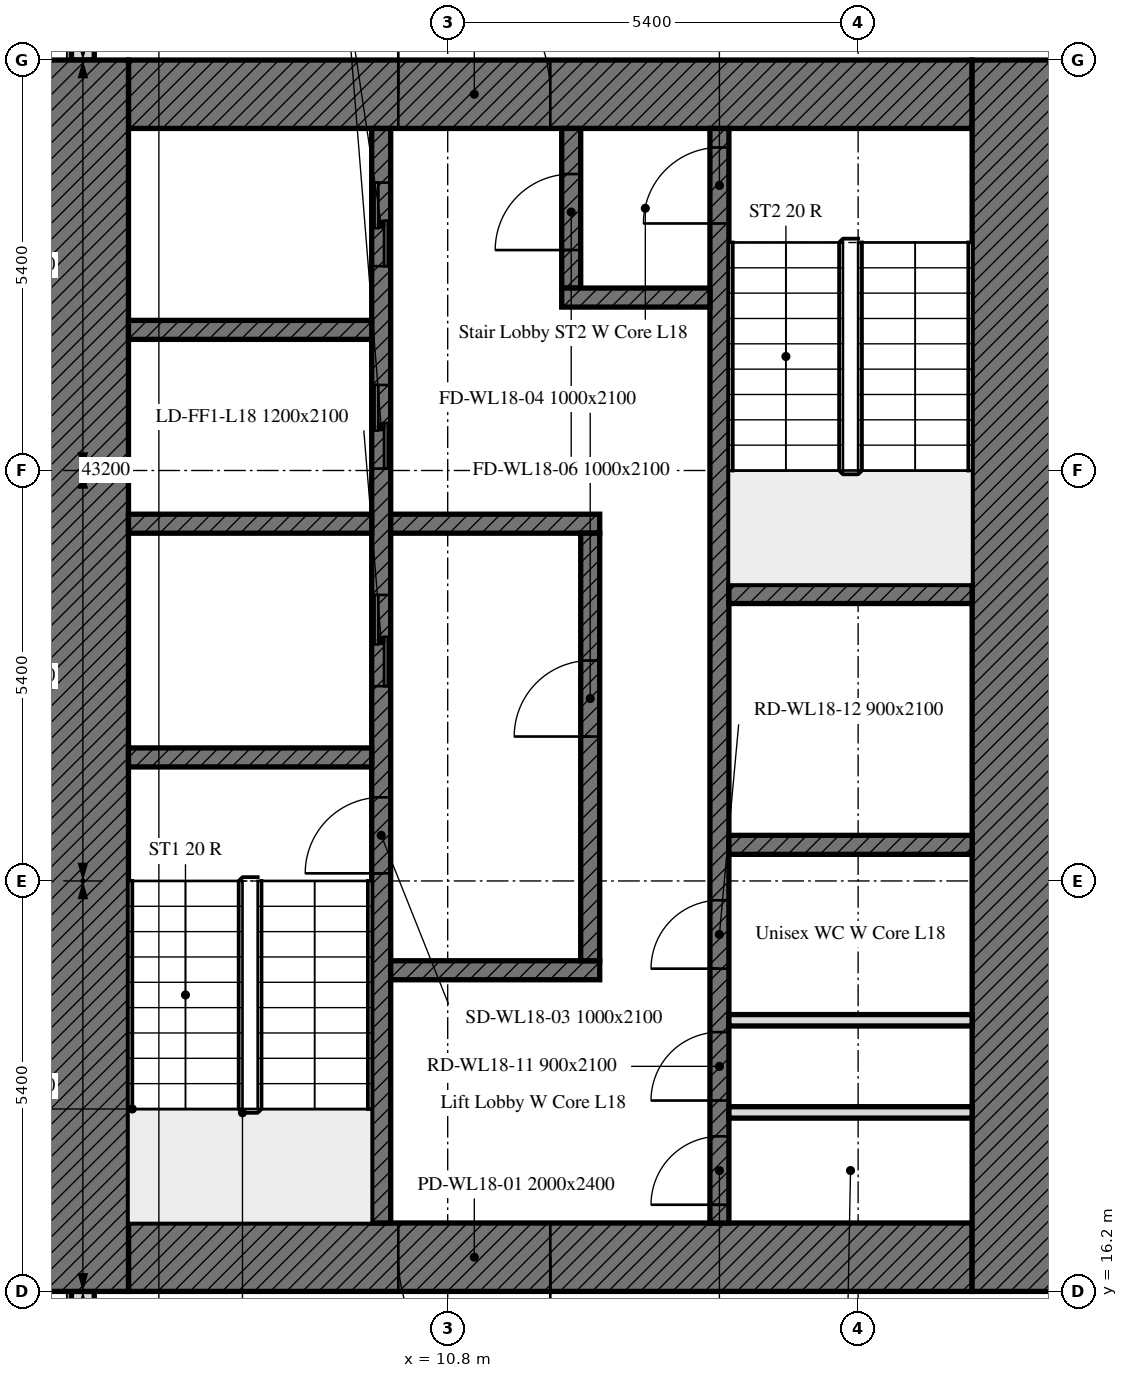
"""IFC4 building model, lengths in metres.
Left out: names, types, materials, properties, quantities, classifications, styles, units other than length and angle.
Written with IfcOpenShell. Run it as: python <this file> out.ifc"""

import sys

from ifc_helpers import new_model, si_unit, direction, frame, frame_2d, origin, place, context, subcontext, project, spatial, rectangle, extrude, element, fill, save


model = new_model("IFC4")
c1 = context("Model", 3, precision=1e-05, world=origin(), true_north=direction((0.0, 1.0)))
c2 = subcontext(c1, "Body", "Model", "MODEL_VIEW")
j1 = project(units=[si_unit("LENGTHUNIT", "METRE"), si_unit("PLANEANGLEUNIT", "RADIAN")], contexts=[c1])
p1 = place(None, origin())
s1 = spatial("IfcSite", under=j1, at=p1, CompositionType="ELEMENT")
p2 = place(p1, origin())
s2 = spatial("IfcBuilding", under=s1, at=p2, CompositionType="ELEMENT")
p3 = place(p2, frame((0.0, 0.0, 80.2)))
s3 = spatial("IfcBuildingStorey", under=s2, at=p3, CompositionType="ELEMENT", Elevation=80.2)
p4 = place(p3, frame((6.0, 43.014, 0.0), z_axis=(0.0, 0.0, 1.0), x_axis=(0.0, -1.0, 0.0)))
e1 = element("IfcWall", 1, at=p4, inside=s3, PredefinedType="SOLIDWALL", context=c2, shape_type="SweptSolid", body=[
    extrude(rectangle(XDim=10.614, YDim=0.3, at=frame_2d((5.307, 0.0))), origin(), (0.0, 0.0, 1.0), 3.5),
])
p5 = place(p4, frame((0.814, 0.0, 0.9)))
e2 = element("IfcOpeningElement", 2, at=p5, cuts=e1, PredefinedType="OPENING", context=c2, shape_type="SweptSolid", body=[
    extrude(rectangle(XDim=3.4, YDim=1.7, at=frame_2d((1.7, 0.85))), frame((0.0, 0.16, 0.0), z_axis=(0.0, -1.0, 0.0), x_axis=(1.0, 0.0, 0.0)), (0.0, 0.0, 1.0), 0.32),
])
p6 = place(p3, frame((6.0, 16.2, 0.0), z_axis=(0.0, 0.0, 1.0), x_axis=(0.0, -1.0, 0.0)))
e3 = element("IfcWall", 3, at=p6, inside=s3, PredefinedType="SOLIDWALL", context=c2, shape_type="SweptSolid", body=[
    extrude(rectangle(XDim=5.214, YDim=0.3, at=frame_2d((2.607, 0.0))), origin(), (0.0, 0.0, 1.0), 3.5),
])
p7 = place(p3, frame((17.7, 16.65, 0.0), z_axis=(0.0, 0.0, 1.0), x_axis=(-1.0, 0.0, 0.0)))
e4 = element("IfcWall", 4, at=p7, inside=s3, PredefinedType="SOLIDWALL", context=c2, shape_type="SweptSolid", body=[
    extrude(rectangle(XDim=11.1, YDim=0.9, at=frame_2d((5.55, 0.0))), origin(), (0.0, 0.0, 1.0), 3.5),
])
p8 = place(p7, frame((5.55, 0.0, 0.0)))
e5 = element("IfcOpeningElement", 5, at=p8, cuts=e4, PredefinedType="OPENING", context=c2, shape_type="SweptSolid", body=[
    extrude(rectangle(XDim=2.0, YDim=2.4, at=frame_2d((1.0, 1.2))), frame((0.0, 0.45, 0.0), z_axis=(0.0, -1.0, 0.0), x_axis=(1.0, 0.0, 0.0)), (0.0, 0.0, 1.0), 0.9),
])
p9 = place(p3, frame((6.6, 31.95, 0.0), z_axis=(0.0, 0.0, 1.0), x_axis=(1.0, 0.0, 0.0)))
e6 = element("IfcWall", 6, at=p9, inside=s3, PredefinedType="SOLIDWALL", context=c2, shape_type="SweptSolid", body=[
    extrude(rectangle(XDim=11.1, YDim=0.9, at=frame_2d((5.55, 0.0))), origin(), (0.0, 0.0, 1.0), 3.5),
])
p10 = place(p9, frame((3.55, 0.0, 0.0)))
e7 = element("IfcOpeningElement", 7, at=p10, cuts=e6, PredefinedType="OPENING", context=c2, shape_type="SweptSolid", body=[
    extrude(rectangle(XDim=2.0, YDim=2.4, at=frame_2d((1.0, 1.2))), frame((0.0, 0.45, 0.0), z_axis=(0.0, -1.0, 0.0), x_axis=(1.0, 0.0, 0.0)), (0.0, 0.0, 1.0), 0.9),
])
for number, where, z_axis, x_axis in (
    (8, (6.0, 16.2, 0.0), (0.0, 0.0, 1.0), (0.0, 1.0, 0.0)),
    (9, (18.3, 32.4, 0.0), (0.0, 0.0, 1.0), (0.0, -1.0, 0.0)),
):
    element("IfcWall", number, at=place(p3, frame(where, z_axis=z_axis, x_axis=x_axis)), inside=s3, PredefinedType="SOLIDWALL", context=c2, shape_type="SweptSolid", body=[
        extrude(rectangle(XDim=16.2, YDim=1.2, at=frame_2d((8.1, 0.0))), origin(), (0.0, 0.0, 1.0), 3.5),
    ])
p11 = place(p3, frame((9.925, 17.1, 0.0), z_axis=(0.0, 0.0, 1.0), x_axis=(0.0, 1.0, 0.0)))
e10 = element("IfcWall", 10, at=p11, inside=s3, PredefinedType="SOLIDWALL", context=c2, shape_type="SweptSolid", body=[
    extrude(rectangle(XDim=14.4, YDim=0.25, at=frame_2d((7.2, 0.0))), origin(), (0.0, 0.0, 1.0), 3.5),
])
p12 = place(p11, frame((4.6, 0.0, 0.0)))
e11 = element("IfcOpeningElement", 11, at=p12, cuts=e10, PredefinedType="OPENING", context=c2, shape_type="SweptSolid", body=[
    extrude(rectangle(XDim=1.0, YDim=2.1, at=frame_2d((0.5, 1.05))), frame((0.0, 0.125, 0.0), z_axis=(0.0, -1.0, 0.0), x_axis=(1.0, 0.0, 0.0)), (0.0, 0.0, 1.0), 0.25),
])
p13 = place(p11, frame((7.062, 0.0, 0.0)))
e12 = element("IfcOpeningElement", 12, at=p13, cuts=e10, PredefinedType="OPENING", context=c2, shape_type="SweptSolid", body=[
    extrude(rectangle(XDim=1.2, YDim=2.1, at=frame_2d((0.6, 1.05))), frame((0.0, 0.125, 0.0), z_axis=(0.0, -1.0, 0.0), x_axis=(1.0, 0.0, 0.0)), (0.0, 0.0, 1.0), 0.25),
])
p14 = place(p11, frame((9.925, 0.0, 0.0)))
e13 = element("IfcOpeningElement", 13, at=p14, cuts=e10, PredefinedType="OPENING", context=c2, shape_type="SweptSolid", body=[
    extrude(rectangle(XDim=1.1, YDim=2.1, at=frame_2d((0.55, 1.05))), frame((0.0, 0.125, 0.0), z_axis=(0.0, -1.0, 0.0), x_axis=(1.0, 0.0, 0.0)), (0.0, 0.0, 1.0), 0.25),
])
p15 = place(p11, frame((12.587, 0.0, 0.0)))
e14 = element("IfcOpeningElement", 14, at=p15, cuts=e10, PredefinedType="OPENING", context=c2, shape_type="SweptSolid", body=[
    extrude(rectangle(XDim=1.1, YDim=2.1, at=frame_2d((0.55, 1.05))), frame((0.0, 0.125, 0.0), z_axis=(0.0, -1.0, 0.0), x_axis=(1.0, 0.0, 0.0)), (0.0, 0.0, 1.0), 0.25),
])
p16 = place(p3, frame((14.375, 17.1, 0.0), z_axis=(0.0, 0.0, 1.0), x_axis=(0.0, 1.0, 0.0)))
e15 = element("IfcWall", 15, at=p16, inside=s3, PredefinedType="SOLIDWALL", context=c2, shape_type="SweptSolid", body=[
    extrude(rectangle(XDim=14.4, YDim=0.25, at=frame_2d((7.2, 0.0))), origin(), (0.0, 0.0, 1.0), 3.5),
])
p17 = place(p16, frame((13.15, 0.0, 0.0)))
e16 = element("IfcOpeningElement", 16, at=p17, cuts=e15, PredefinedType="OPENING", context=c2, shape_type="SweptSolid", body=[
    extrude(rectangle(XDim=1.0, YDim=2.1, at=frame_2d((0.5, 1.05))), frame((0.0, 0.125, 0.0), z_axis=(0.0, -1.0, 0.0), x_axis=(1.0, 0.0, 0.0)), (0.0, 0.0, 1.0), 0.25),
])
p18 = place(p16, frame((0.24, 0.0, 0.0)))
e17 = element("IfcOpeningElement", 17, at=p18, cuts=e15, PredefinedType="OPENING", context=c2, shape_type="SweptSolid", body=[
    extrude(rectangle(XDim=0.9, YDim=2.1, at=frame_2d((0.45, 1.05))), frame((0.0, 0.125, 0.0), z_axis=(0.0, -1.0, 0.0), x_axis=(1.0, 0.0, 0.0)), (0.0, 0.0, 1.0), 0.25),
])
p19 = place(p16, frame((1.611, 0.0, 0.0)))
e18 = element("IfcOpeningElement", 18, at=p19, cuts=e15, PredefinedType="OPENING", context=c2, shape_type="SweptSolid", body=[
    extrude(rectangle(XDim=0.9, YDim=2.1, at=frame_2d((0.45, 1.05))), frame((0.0, 0.125, 0.0), z_axis=(0.0, -1.0, 0.0), x_axis=(1.0, 0.0, 0.0)), (0.0, 0.0, 1.0), 0.25),
])
p20 = place(p16, frame((3.346, 0.0, 0.0)))
e19 = element("IfcOpeningElement", 19, at=p20, cuts=e15, PredefinedType="OPENING", context=c2, shape_type="SweptSolid", body=[
    extrude(rectangle(XDim=0.9, YDim=2.1, at=frame_2d((0.45, 1.05))), frame((0.0, 0.125, 0.0), z_axis=(0.0, -1.0, 0.0), x_axis=(1.0, 0.0, 0.0)), (0.0, 0.0, 1.0), 0.25),
])
for number, where, z_axis, x_axis in (
    (20, (6.6, 23.225, 0.0), (0.0, 0.0, 1.0), (1.0, 0.0, 0.0)),
    (21, (14.5, 25.375, 0.0), (0.0, 0.0, 1.0), (1.0, 0.0, 0.0)),
    (22, (14.5, 22.075, 0.0), (0.0, 0.0, 1.0), (1.0, 0.0, 0.0)),
    (23, (6.6, 26.3, 0.0), (0.0, 0.0, 1.0), (1.0, 0.0, 0.0)),
):
    element("IfcWall", number, at=place(p3, frame(where, z_axis=z_axis, x_axis=x_axis)), inside=s3, PredefinedType="SOLIDWALL", context=c2, shape_type="SweptSolid", body=[
        extrude(rectangle(XDim=3.2, YDim=0.25, at=frame_2d((1.6, 0.0))), origin(), (0.0, 0.0, 1.0), 3.5),
    ])
for number, where, z_axis, x_axis in (
    (24, (10.05, 26.3, 0.0), (0.0, 0.0, 1.0), (1.0, 0.0, 0.0)),
    (25, (10.05, 20.425, 0.0), (0.0, 0.0, 1.0), (1.0, 0.0, 0.0)),
):
    element("IfcWall", number, at=place(p3, frame(where, z_axis=z_axis, x_axis=x_axis)), inside=s3, PredefinedType="SOLIDWALL", context=c2, shape_type="SweptSolid", body=[
        extrude(rectangle(XDim=2.75, YDim=0.25, at=frame_2d((1.375, 0.0))), origin(), (0.0, 0.0, 1.0), 3.5),
    ])
p21 = place(p3, frame((12.425, 29.4, 0.0), z_axis=(0.0, 0.0, 1.0), x_axis=(0.0, 1.0, 0.0)))
e26 = element("IfcWall", 26, at=p21, inside=s3, PredefinedType="SOLIDWALL", context=c2, shape_type="SweptSolid", body=[
    extrude(rectangle(XDim=2.1, YDim=0.25, at=frame_2d((1.05, 0.0))), origin(), (0.0, 0.0, 1.0), 3.5),
])
p22 = place(p21, frame((0.5, 0.0, 0.0)))
e27 = element("IfcOpeningElement", 27, at=p22, cuts=e26, PredefinedType="OPENING", context=c2, shape_type="SweptSolid", body=[
    extrude(rectangle(XDim=1.0, YDim=2.1, at=frame_2d((0.5, 1.05))), frame((0.0, 0.125, 0.0), z_axis=(0.0, -1.0, 0.0), x_axis=(1.0, 0.0, 0.0)), (0.0, 0.0, 1.0), 0.25),
])
p23 = place(p3, frame((12.3, 29.275, 0.0), z_axis=(0.0, 0.0, 1.0), x_axis=(1.0, 0.0, 0.0)))
e28 = element("IfcWall", 28, at=p23, inside=s3, PredefinedType="SOLIDWALL", context=c2, shape_type="SweptSolid", body=[
    extrude(rectangle(XDim=1.95, YDim=0.25, at=frame_2d((0.975, 0.0))), origin(), (0.0, 0.0, 1.0), 3.5),
])
p24 = place(p3, frame((12.675, 20.55, 0.0), z_axis=(0.0, 0.0, 1.0), x_axis=(0.0, 1.0, 0.0)))
e29 = element("IfcWall", 29, at=p24, inside=s3, PredefinedType="SOLIDWALL", context=c2, shape_type="SweptSolid", body=[
    extrude(rectangle(XDim=5.625, YDim=0.25, at=frame_2d((2.812, 0.0))), origin(), (0.0, 0.0, 1.0), 3.5),
])
p25 = place(p24, frame((2.95, 0.0, 0.0)))
e30 = element("IfcOpeningElement", 30, at=p25, cuts=e29, PredefinedType="OPENING", context=c2, shape_type="SweptSolid", body=[
    extrude(rectangle(XDim=1.0, YDim=2.1, at=frame_2d((0.5, 1.05))), frame((0.0, 0.125, 0.0), z_axis=(0.0, -1.0, 0.0), x_axis=(1.0, 0.0, 0.0)), (0.0, 0.0, 1.0), 0.25),
])
p26 = place(p3, frame((6.6, 28.85, 0.0), z_axis=(0.0, 0.0, 1.0), x_axis=(1.0, 0.0, 0.0)))
e31 = element("IfcWall", 31, at=p26, inside=s3, PredefinedType="SOLIDWALL", context=c2, shape_type="SweptSolid", body=[
    extrude(rectangle(XDim=3.2, YDim=0.25, at=frame_2d((1.6, 0.0))), origin(), (0.0, 0.0, 1.0), 3.5),
])
for number, where, z_axis, x_axis in (
    (32, (14.5, 18.555, 0.0), (0.0, 0.0, 1.0), (1.0, 0.0, 0.0)),
    (33, (14.5, 19.767, 0.0), (0.0, 0.0, 1.0), (1.0, 0.0, 0.0)),
):
    element("IfcWall", number, at=place(p3, frame(where, z_axis=z_axis, x_axis=x_axis)), inside=s3, PredefinedType="PARTITIONING", context=c2, shape_type="SweptSolid", body=[
        extrude(rectangle(XDim=3.2, YDim=0.15, at=frame_2d((1.6, 0.0))), origin(), (0.0, 0.0, 1.0), 3.5),
    ])
p27 = place(p8, origin())
e34 = element("IfcDoor", 34, at=p27, inside=s3, OperationType="DOUBLE_DOOR_SINGLE_SWING", PredefinedType="DOOR", context=c2, shape_type="SweptSolid", body=[
    extrude(rectangle(XDim=2.0, YDim=2.4, at=frame_2d((1.0, 1.2))), frame((0.0, 0.025, 0.0), z_axis=(0.0, -1.0, 0.0), x_axis=(1.0, 0.0, 0.0)), (0.0, 0.0, 1.0), 0.05),
])
fill(e5, e34)
p28 = place(p10, origin())
e35 = element("IfcDoor", 35, at=p28, inside=s3, OperationType="DOUBLE_DOOR_SINGLE_SWING", PredefinedType="DOOR", context=c2, shape_type="SweptSolid", body=[
    extrude(rectangle(XDim=2.0, YDim=2.4, at=frame_2d((1.0, 1.2))), frame((0.0, 0.025, 0.0), z_axis=(0.0, -1.0, 0.0), x_axis=(1.0, 0.0, 0.0)), (0.0, 0.0, 1.0), 0.05),
])
fill(e7, e35)
p29 = place(p12, origin())
e36 = element("IfcDoor", 36, at=p29, inside=s3, OperationType="SINGLE_SWING_LEFT", PredefinedType="DOOR", context=c2, shape_type="SweptSolid", body=[
    extrude(rectangle(XDim=1.0, YDim=2.1, at=frame_2d((0.5, 1.05))), frame((0.0, 0.025, 0.0), z_axis=(0.0, -1.0, 0.0), x_axis=(1.0, 0.0, 0.0)), (0.0, 0.0, 1.0), 0.05),
])
fill(e11, e36)
p30 = place(p25, origin())
e37 = element("IfcDoor", 37, at=p30, inside=s3, OperationType="SINGLE_SWING_LEFT", PredefinedType="DOOR", context=c2, shape_type="SweptSolid", body=[
    extrude(rectangle(XDim=1.0, YDim=2.1, at=frame_2d((0.5, 1.05))), frame((0.0, 0.025, 0.0), z_axis=(0.0, -1.0, 0.0), x_axis=(1.0, 0.0, 0.0)), (0.0, 0.0, 1.0), 0.05),
])
fill(e30, e37)
p31 = place(p17, origin())
e38 = element("IfcDoor", 38, at=p31, inside=s3, OperationType="SINGLE_SWING_LEFT", PredefinedType="DOOR", context=c2, shape_type="SweptSolid", body=[
    extrude(rectangle(XDim=1.0, YDim=2.1, at=frame_2d((0.5, 1.05))), frame((0.0, 0.025, 0.0), z_axis=(0.0, -1.0, 0.0), x_axis=(1.0, 0.0, 0.0)), (0.0, 0.0, 1.0), 0.05),
])
fill(e16, e38)
p32 = place(p22, origin())
e39 = element("IfcDoor", 39, at=p32, inside=s3, OperationType="SINGLE_SWING_LEFT", PredefinedType="DOOR", context=c2, shape_type="SweptSolid", body=[
    extrude(rectangle(XDim=1.0, YDim=2.1, at=frame_2d((0.5, 1.05))), frame((0.0, 0.025, 0.0), z_axis=(0.0, -1.0, 0.0), x_axis=(1.0, 0.0, 0.0)), (0.0, 0.0, 1.0), 0.05),
])
fill(e27, e39)
p33 = place(p13, origin())
e40 = element("IfcDoor", 40, at=p33, inside=s3, OperationType="DOUBLE_DOOR_SLIDING", PredefinedType="DOOR", context=c2, shape_type="SweptSolid", body=[
    extrude(rectangle(XDim=1.2, YDim=2.1, at=frame_2d((0.6, 1.05))), frame((0.0, 0.025, 0.0), z_axis=(0.0, -1.0, 0.0), x_axis=(1.0, 0.0, 0.0)), (0.0, 0.0, 1.0), 0.05),
])
fill(e12, e40)
p34 = place(p14, origin())
e41 = element("IfcDoor", 41, at=p34, inside=s3, OperationType="DOUBLE_DOOR_SLIDING", PredefinedType="DOOR", context=c2, shape_type="SweptSolid", body=[
    extrude(rectangle(XDim=1.1, YDim=2.1, at=frame_2d((0.55, 1.05))), frame((0.0, 0.025, 0.0), z_axis=(0.0, -1.0, 0.0), x_axis=(1.0, 0.0, 0.0)), (0.0, 0.0, 1.0), 0.05),
])
fill(e13, e41)
p35 = place(p15, origin())
e42 = element("IfcDoor", 42, at=p35, inside=s3, OperationType="DOUBLE_DOOR_SLIDING", PredefinedType="DOOR", context=c2, shape_type="SweptSolid", body=[
    extrude(rectangle(XDim=1.1, YDim=2.1, at=frame_2d((0.55, 1.05))), frame((0.0, 0.025, 0.0), z_axis=(0.0, -1.0, 0.0), x_axis=(1.0, 0.0, 0.0)), (0.0, 0.0, 1.0), 0.05),
])
fill(e14, e42)
p36 = place(p18, origin())
e43 = element("IfcDoor", 43, at=p36, inside=s3, OperationType="SINGLE_SWING_LEFT", PredefinedType="DOOR", context=c2, shape_type="SweptSolid", body=[
    extrude(rectangle(XDim=0.9, YDim=2.1, at=frame_2d((0.45, 1.05))), frame((0.0, 0.025, 0.0), z_axis=(0.0, -1.0, 0.0), x_axis=(1.0, 0.0, 0.0)), (0.0, 0.0, 1.0), 0.05),
])
fill(e17, e43)
p37 = place(p19, origin())
e44 = element("IfcDoor", 44, at=p37, inside=s3, OperationType="SINGLE_SWING_LEFT", PredefinedType="DOOR", context=c2, shape_type="SweptSolid", body=[
    extrude(rectangle(XDim=0.9, YDim=2.1, at=frame_2d((0.45, 1.05))), frame((0.0, 0.025, 0.0), z_axis=(0.0, -1.0, 0.0), x_axis=(1.0, 0.0, 0.0)), (0.0, 0.0, 1.0), 0.05),
])
fill(e18, e44)
p38 = place(p20, origin())
e45 = element("IfcDoor", 45, at=p38, inside=s3, OperationType="SINGLE_SWING_LEFT", PredefinedType="DOOR", context=c2, shape_type="SweptSolid", body=[
    extrude(rectangle(XDim=0.9, YDim=2.1, at=frame_2d((0.45, 1.05))), frame((0.0, 0.025, 0.0), z_axis=(0.0, -1.0, 0.0), x_axis=(1.0, 0.0, 0.0)), (0.0, 0.0, 1.0), 0.05),
])
fill(e19, e45)
save(model, sys.argv[1])
